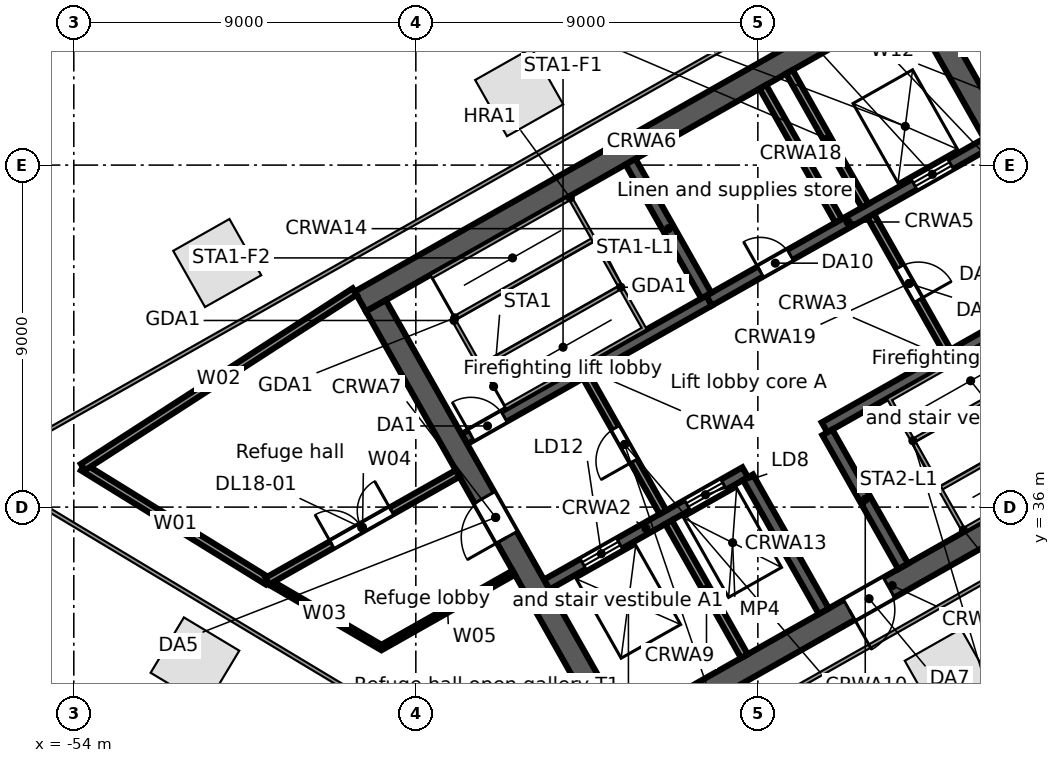
"""IFC4 building model, lengths in metres.
Left out: names, types, materials, properties, quantities, classifications, styles, units other than length and angle.
Written with IfcOpenShell. Run it as: python <this file> out.ifc"""

import sys

from ifc_helpers import new_model, si_unit, direction, frame, frame_2d, origin, origin_2d, place, context, subcontext, project, spatial, rectangle, extrude, element, fill, save


model = new_model("IFC4")
c1 = context("Model", 3, precision=1e-05, world=origin(), true_north=direction((0.0, 1.0)))
c2 = subcontext(c1, "Body", "Model", "MODEL_VIEW")
j1 = project(units=[si_unit("LENGTHUNIT", "METRE"), si_unit("PLANEANGLEUNIT", "RADIAN")], contexts=[c1])
p1 = place(None, origin())
s1 = spatial("IfcSite", under=j1, at=p1, CompositionType="ELEMENT")
p2 = place(p1, origin())
s2 = spatial("IfcBuilding", under=s1, at=p2, CompositionType="ELEMENT")
p3 = place(p2, frame((0.0, 0.0, 91.5)))
s3 = spatial("IfcBuildingStorey", under=s2, at=p3, CompositionType="ELEMENT", Elevation=91.5)
for number, where, z_axis, x_axis in (
    (1, (-42.28, 46.919, 0.0), (0.0, 0.0, 1.0), (-0.87, -0.492, 0.0)),
    (2, (-50.226, 42.423, 0.0), (0.0, 0.0, 1.0), (-0.87, -0.492, 0.0)),
    (3, (-50.812, 31.931, 0.0), (0.0, 0.0, 1.0), (0.857, -0.515, 0.0)),
    (4, (-30.976, 31.635, 0.0), (0.0, 0.0, 1.0), (0.87, 0.492, 0.0)),
):
    element("IfcColumn", number, at=place(p3, frame(where, z_axis=z_axis, x_axis=x_axis)), inside=s3, PredefinedType="COLUMN", context=c2, shape_type="SweptSolid", body=[
        extrude(rectangle(XDim=1.7, YDim=1.7, at=origin_2d()), origin(), (0.0, 0.0, 1.0), 5.6),
    ])
p4 = place(p3, frame((-39.862, 29.749, 0.0), z_axis=(0.0, 0.0, 1.0), x_axis=(0.870350116061, 0.492433422375, 0.0)))
e5 = element("IfcWall", 5, at=p4, inside=s3, PredefinedType="SOLIDWALL", context=c2, shape_type="SweptSolid", body=[
    extrude(rectangle(XDim=17.0, YDim=0.6, at=frame_2d((8.5, 0.0))), origin(), (0.0, 0.0, 1.0), 5.28),
])
p5 = place(p4, frame((7.2, 0.0, 0.0)))
e6 = element("IfcOpeningElement", 6, at=p5, cuts=e5, PredefinedType="OPENING", context=c2, shape_type="SweptSolid", body=[
    extrude(rectangle(XDim=1.2, YDim=2.1, at=frame_2d((0.6, 1.05))), frame((0.0, 0.31, 0.0), z_axis=(0.0, -1.0, 0.0), x_axis=(1.0, 0.0, 0.0)), (0.0, 0.0, 1.0), 0.62),
])
p6 = place(p3, frame((-41.556, 33.961, 0.0), z_axis=(0.0, 0.0, 1.0), x_axis=(0.870343731308, 0.492444706919, 0.0)))
e7 = element("IfcWall", 7, at=p6, inside=s3, PredefinedType="SOLIDWALL", context=c2, shape_type="SweptSolid", body=[
    extrude(rectangle(XDim=6.0, YDim=0.3, at=frame_2d((3.0, 0.0))), origin(), (0.0, 0.0, 1.0), 5.28),
])
p7 = place(p6, frame((1.1, 0.0, 0.0)))
e8 = element("IfcOpeningElement", 8, at=p7, cuts=e7, PredefinedType="OPENING", context=c2, shape_type="SweptSolid", body=[
    extrude(rectangle(XDim=1.1, YDim=2.1, at=frame_2d((0.55, 1.05))), frame((0.0, 0.16, 0.0), z_axis=(0.0, -1.0, 0.0), x_axis=(1.0, 0.0, 0.0)), (0.0, 0.0, 1.0), 0.32),
])
p8 = place(p6, frame((4.25, 0.0, 0.0)))
e9 = element("IfcOpeningElement", 9, at=p8, cuts=e7, PredefinedType="OPENING", context=c2, shape_type="SweptSolid", body=[
    extrude(rectangle(XDim=1.1, YDim=2.1, at=frame_2d((0.55, 1.05))), frame((0.0, 0.16, 0.0), z_axis=(0.0, -1.0, 0.0), x_axis=(1.0, 0.0, 0.0)), (0.0, 0.0, 1.0), 0.32),
])
p9 = place(p3, frame((-34.245, 38.097, 0.0), z_axis=(0.0, 0.0, 1.0), x_axis=(0.870364910201, 0.492407273597, 0.0)))
e10 = element("IfcWall", 10, at=p9, inside=s3, PredefinedType="SOLIDWALL", context=c2, shape_type="SweptSolid", body=[
    extrude(rectangle(XDim=7.4, YDim=0.3, at=frame_2d((3.7, 0.0))), origin(), (0.0, 0.0, 1.0), 5.28),
])
p10 = place(p9, frame((6.2, 0.0, 0.0)))
e11 = element("IfcOpeningElement", 11, at=p10, cuts=e10, PredefinedType="OPENING", context=c2, shape_type="SweptSolid", body=[
    extrude(rectangle(XDim=1.0, YDim=2.1, at=frame_2d((0.5, 1.05))), frame((0.0, 0.16, 0.0), z_axis=(0.0, -1.0, 0.0), x_axis=(1.0, 0.0, 0.0)), (0.0, 0.0, 1.0), 0.32),
])
p11 = place(p3, frame((-43.723, 37.791, 0.0), z_axis=(0.0, 0.0, 1.0), x_axis=(0.87035077051, 0.49243226567, 0.0)))
e12 = element("IfcWall", 12, at=p11, inside=s3, PredefinedType="SOLIDWALL", context=c2, shape_type="SweptSolid", body=[
    extrude(rectangle(XDim=7.4, YDim=0.3, at=frame_2d((3.7, 0.0))), origin(), (0.0, 0.0, 1.0), 5.28),
])
p12 = place(p11, frame((0.2, 0.0, 0.0)))
e13 = element("IfcOpeningElement", 13, at=p12, cuts=e12, PredefinedType="OPENING", context=c2, shape_type="SweptSolid", body=[
    extrude(rectangle(XDim=1.0, YDim=2.1, at=frame_2d((0.5, 1.05))), frame((0.0, 0.16, 0.0), z_axis=(0.0, -1.0, 0.0), x_axis=(1.0, 0.0, 0.0)), (0.0, 0.0, 1.0), 0.32),
])
p13 = place(p3, frame((-37.282, 41.435, 0.0), z_axis=(0.0, 0.0, 1.0), x_axis=(0.870356516133, 0.492422110414, 0.0)))
e14 = element("IfcWall", 14, at=p13, inside=s3, PredefinedType="SOLIDWALL", context=c2, shape_type="SweptSolid", body=[
    extrude(rectangle(XDim=8.4, YDim=0.3, at=frame_2d((4.2, 0.0))), origin(), (0.0, 0.0, 1.0), 5.28),
])
p14 = place(p13, frame((6.2, 0.0, 0.0)))
e15 = element("IfcOpeningElement", 15, at=p14, cuts=e14, PredefinedType="OPENING", context=c2, shape_type="SweptSolid", body=[
    extrude(rectangle(XDim=1.1, YDim=2.1, at=frame_2d((0.55, 1.05))), frame((0.0, 0.16, 0.0), z_axis=(0.0, -1.0, 0.0), x_axis=(1.0, 0.0, 0.0)), (0.0, 0.0, 1.0), 0.32),
])
p15 = place(p13, frame((1.55, 0.0, 0.0)))
e16 = element("IfcOpeningElement", 16, at=p15, cuts=e14, PredefinedType="OPENING", context=c2, shape_type="SweptSolid", body=[
    extrude(rectangle(XDim=0.9, YDim=2.1, at=frame_2d((0.45, 1.05))), frame((0.0, 0.16, 0.0), z_axis=(0.0, -1.0, 0.0), x_axis=(1.0, 0.0, 0.0)), (0.0, 0.0, 1.0), 0.32),
])
p16 = place(p3, frame((-46.461, 41.412, 0.0), z_axis=(0.0, 0.0, 1.0), x_axis=(0.870350116061, 0.492433422375, 0.0)))
e17 = element("IfcWall", 17, at=p16, inside=s3, PredefinedType="SOLIDWALL", context=c2, shape_type="SweptSolid", body=[
    extrude(rectangle(XDim=17.0, YDim=0.6, at=frame_2d((8.5, 0.0))), origin(), (0.0, 0.0, 1.0), 5.28),
])
p17 = place(p3, frame((-46.052, 41.298, 0.0), z_axis=(0.0, 0.0, 1.0), x_axis=(0.492418598281, -0.870358503186, 0.0)))
e18 = element("IfcWall", 18, at=p17, inside=s3, PredefinedType="SOLIDWALL", context=c2, shape_type="SweptSolid", body=[
    extrude(rectangle(XDim=12.8, YDim=0.6, at=frame_2d((6.4, 0.0))), origin(), (0.0, 0.0, 1.0), 5.28),
])
p18 = place(p17, frame((5.8, 0.0, 0.0)))
e19 = element("IfcOpeningElement", 19, at=p18, cuts=e18, PredefinedType="OPENING", context=c2, shape_type="SweptSolid", body=[
    extrude(rectangle(XDim=1.2, YDim=2.1, at=frame_2d((0.6, 1.05))), frame((0.0, 0.31, 0.0), z_axis=(0.0, -1.0, 0.0), x_axis=(1.0, 0.0, 0.0)), (0.0, 0.0, 1.0), 0.62),
])
p19 = place(p3, frame((-38.349, 35.603, 0.0), z_axis=(0.0, 0.0, 1.0), x_axis=(0.49241474071, -0.870360685654, 0.0)))
e20 = element("IfcWall", 20, at=p19, inside=s3, PredefinedType="SOLIDWALL", context=c2, shape_type="SweptSolid", body=[
    extrude(rectangle(XDim=4.05, YDim=0.2, at=frame_2d((2.025, 0.0))), origin(), (0.0, 0.0, 1.0), 5.28),
])
p20 = place(p3, frame((-40.516, 39.433, 0.0), z_axis=(0.0, 0.0, 1.0), x_axis=(0.492453559952, -0.87033872216, 0.0)))
e21 = element("IfcWall", 21, at=p20, inside=s3, PredefinedType="PARTITIONING", context=c2, shape_type="SweptSolid", body=[
    extrude(rectangle(XDim=4.1, YDim=0.2, at=frame_2d((2.05, 0.0))), origin(), (0.0, 0.0, 1.0), 5.28),
])
p21 = place(p20, frame((1.55, 0.0, 0.0)))
e22 = element("IfcOpeningElement", 22, at=p21, cuts=e21, PredefinedType="OPENING", context=c2, shape_type="SweptSolid", body=[
    extrude(rectangle(XDim=1.0, YDim=2.1, at=frame_2d((0.5, 1.05))), frame((0.0, 0.11, 0.0), z_axis=(0.0, -1.0, 0.0), x_axis=(1.0, 0.0, 0.0)), (0.0, 0.0, 1.0), 0.22),
])
p22 = place(p3, frame((-36.26, 36.785, 0.0), z_axis=(0.0, 0.0, 1.0), x_axis=(0.492440575896, -0.870346068648, 0.0)))
e23 = element("IfcWall", 23, at=p22, inside=s3, PredefinedType="SOLIDWALL", context=c2, shape_type="SweptSolid", body=[
    extrude(rectangle(XDim=4.05, YDim=0.3, at=frame_2d((2.025, 0.0))), origin(), (0.0, 0.0, 1.0), 5.28),
])
p23 = place(p3, frame((-39.35, 45.09, 0.0), z_axis=(0.0, 0.0, 1.0), x_axis=(0.49241474071, -0.870360685654, 0.0)))
e24 = element("IfcWall", 24, at=p23, inside=s3, PredefinedType="SOLIDWALL", context=c2, shape_type="SweptSolid", body=[
    extrude(rectangle(XDim=4.05, YDim=0.3, at=frame_2d((2.025, 0.0))), origin(), (0.0, 0.0, 1.0), 5.28),
])
p24 = place(p3, frame((-34.171, 37.967, 0.0), z_axis=(0.0, 0.0, 1.0), x_axis=(0.492394910396, -0.870371904542, 0.0)))
e25 = element("IfcWall", 25, at=p24, inside=s3, PredefinedType="SOLIDWALL", context=c2, shape_type="SweptSolid", body=[
    extrude(rectangle(XDim=4.05, YDim=0.3, at=frame_2d((2.025, 0.0))), origin(), (0.0, 0.0, 1.0), 5.28),
])
p25 = place(p3, frame((-35.869, 47.06, 0.0), z_axis=(0.0, 0.0, 1.0), x_axis=(0.49241474071, -0.870360685654, 0.0)))
e26 = element("IfcWall", 26, at=p25, inside=s3, PredefinedType="SOLIDWALL", context=c2, shape_type="SweptSolid", body=[
    extrude(rectangle(XDim=4.05, YDim=0.2, at=frame_2d((2.025, 0.0))), origin(), (0.0, 0.0, 1.0), 5.28),
])
p26 = place(p3, frame((-33.031, 43.667, 0.0), z_axis=(0.0, 0.0, 1.0), x_axis=(0.492408451753, -0.87036424366, 0.0)))
e27 = element("IfcWall", 27, at=p26, inside=s3, PredefinedType="PARTITIONING", context=c2, shape_type="SweptSolid", body=[
    extrude(rectangle(XDim=4.1, YDim=0.2, at=frame_2d((2.05, 0.0))), origin(), (0.0, 0.0, 1.0), 5.28),
])
p27 = place(p26, frame((1.55, 0.0, 0.0)))
e28 = element("IfcOpeningElement", 28, at=p27, cuts=e27, PredefinedType="OPENING", context=c2, shape_type="SweptSolid", body=[
    extrude(rectangle(XDim=1.0, YDim=2.1, at=frame_2d((0.5, 1.05))), frame((0.0, 0.11, 0.0), z_axis=(0.0, -1.0, 0.0), x_axis=(1.0, 0.0, 0.0)), (0.0, 0.0, 1.0), 0.22),
])
p28 = place(p3, frame((-35.173, 47.454, 0.0), z_axis=(0.0, 0.0, 1.0), x_axis=(0.492440575896, -0.870346068648, 0.0)))
e29 = element("IfcWall", 29, at=p28, inside=s3, PredefinedType="SOLIDWALL", context=c2, shape_type="SweptSolid", body=[
    extrude(rectangle(XDim=4.05, YDim=0.2, at=frame_2d((2.025, 0.0))), origin(), (0.0, 0.0, 1.0), 5.28),
])
p29 = place(p3, frame((-31.778, 49.374, 0.0), z_axis=(0.0, 0.0, 1.0), x_axis=(0.492433046652, -0.870350328641, 0.0)))
e30 = element("IfcWall", 30, at=p29, inside=s3, PredefinedType="SOLIDWALL", context=c2, shape_type="SweptSolid", body=[
    extrude(rectangle(XDim=12.8, YDim=0.6, at=frame_2d((6.4, 0.0))), origin(), (0.0, 0.0, 1.0), 5.28),
])
p30 = place(p29, frame((5.8, 0.0, 0.0)))
e31 = element("IfcOpeningElement", 31, at=p30, cuts=e30, PredefinedType="OPENING", context=c2, shape_type="SweptSolid", body=[
    extrude(rectangle(XDim=1.2, YDim=2.1, at=frame_2d((0.6, 1.05))), frame((0.0, 0.31, 0.0), z_axis=(0.0, -1.0, 0.0), x_axis=(1.0, 0.0, 0.0)), (0.0, 0.0, 1.0), 0.62),
])
p31 = place(p3, frame((-53.76, 37.052, 0.0), z_axis=(0.0, 0.0, 1.0), x_axis=(0.850846379399, -0.525414539828, 0.0)))
e32 = element("IfcWall", 32, at=p31, inside=s3, PredefinedType="PARTITIONING", context=c2, shape_type="SweptSolid", body=[
    extrude(rectangle(XDim=5.706, YDim=0.2, at=frame_2d((2.853, 0.0))), origin(), (0.0, 0.0, 1.0), 5.28),
])
p32 = place(p3, frame((-53.76, 37.052, 0.0), z_axis=(0.0, 0.0, 1.0), x_axis=(0.83989696129, 0.542745883831, 0.0)))
e33 = element("IfcWall", 33, at=p32, inside=s3, PredefinedType="PARTITIONING", context=c2, shape_type="SweptSolid", body=[
    extrude(rectangle(XDim=8.514, YDim=0.2, at=frame_2d((4.257, 0.0))), origin(), (0.0, 0.0, 1.0), 4.36),
])
p33 = place(p3, frame((-48.905, 34.054, 0.0), z_axis=(0.0, 0.0, 1.0), x_axis=(0.863972582591, -0.50353885305, 0.0)))
e34 = element("IfcWall", 34, at=p33, inside=s3, PredefinedType="PARTITIONING", context=c2, shape_type="SweptSolid", body=[
    extrude(rectangle(XDim=3.473, YDim=0.125, at=frame_2d((1.737, 0.0))), origin(), (0.0, 0.0, 1.0), 4.36),
])
p34 = place(p3, frame((-48.905, 34.054, 0.0), z_axis=(0.0, 0.0, 1.0), x_axis=(0.870335821512, 0.492458686383, 0.0)))
e35 = element("IfcWall", 35, at=p34, inside=s3, PredefinedType="PARTITIONING", context=c2, shape_type="SweptSolid", body=[
    extrude(rectangle(XDim=5.751, YDim=0.2, at=frame_2d((2.875, 0.0))), origin(), (0.0, 0.0, 1.0), 4.36),
])
p35 = place(p34, frame((1.95, 0.0, 0.0)))
e36 = element("IfcOpeningElement", 36, at=p35, cuts=e35, PredefinedType="OPENING", context=c2, shape_type="SweptSolid", body=[
    extrude(rectangle(XDim=1.8, YDim=2.1, at=frame_2d((0.9, 1.05))), frame((0.0, 0.11, 0.0), z_axis=(0.0, -1.0, 0.0), x_axis=(1.0, 0.0, 0.0)), (0.0, 0.0, 1.0), 0.22),
])
p36 = place(p3, frame((-45.904, 32.305, 0.0), z_axis=(0.0, 0.0, 1.0), x_axis=(0.870297830159, 0.492525823506, 0.0)))
e37 = element("IfcWall", 37, at=p36, inside=s3, PredefinedType="PARTITIONING", context=c2, shape_type="SweptSolid", body=[
    extrude(rectangle(XDim=4.0, YDim=0.125, at=frame_2d((2.0, 0.0))), origin(), (0.0, 0.0, 1.0), 5.28),
])
p37 = place(p14, origin())
e38 = element("IfcDoor", 38, at=p37, inside=s3, OperationType="DOUBLE_DOOR_SLIDING", PredefinedType="DOOR", context=c2, shape_type="SweptSolid", body=[
    extrude(rectangle(XDim=1.1, YDim=2.1, at=frame_2d((0.55, 1.05))), frame((0.0, 0.025, 0.0), z_axis=(0.0, -1.0, 0.0), x_axis=(1.0, 0.0, 0.0)), (0.0, 0.0, 1.0), 0.05),
])
fill(e15, e38)
p38 = place(p7, origin())
e39 = element("IfcDoor", 39, at=p38, inside=s3, OperationType="DOUBLE_DOOR_SLIDING", PredefinedType="DOOR", context=c2, shape_type="SweptSolid", body=[
    extrude(rectangle(XDim=1.1, YDim=2.1, at=frame_2d((0.55, 1.05))), frame((0.0, 0.025, 0.0), z_axis=(0.0, -1.0, 0.0), x_axis=(1.0, 0.0, 0.0)), (0.0, 0.0, 1.0), 0.05),
])
fill(e8, e39)
p39 = place(p8, origin())
e40 = element("IfcDoor", 40, at=p39, inside=s3, OperationType="DOUBLE_DOOR_SLIDING", PredefinedType="DOOR", context=c2, shape_type="SweptSolid", body=[
    extrude(rectangle(XDim=1.1, YDim=2.1, at=frame_2d((0.55, 1.05))), frame((0.0, 0.025, 0.0), z_axis=(0.0, -1.0, 0.0), x_axis=(1.0, 0.0, 0.0)), (0.0, 0.0, 1.0), 0.05),
])
fill(e9, e40)
p40 = place(p12, origin())
e41 = element("IfcDoor", 41, at=p40, inside=s3, OperationType="SINGLE_SWING_LEFT", PredefinedType="DOOR", context=c2, shape_type="SweptSolid", body=[
    extrude(rectangle(XDim=1.0, YDim=2.1, at=frame_2d((0.5, 1.05))), frame((0.0, 0.025, 0.0), z_axis=(0.0, -1.0, 0.0), x_axis=(1.0, 0.0, 0.0)), (0.0, 0.0, 1.0), 0.05),
])
fill(e13, e41)
p41 = place(p21, frame((1.0, 0.0, 0.0), z_axis=(0.0, 0.0, 1.0), x_axis=(-1.0, 0.0, 0.0)))
e42 = element("IfcDoor", 42, at=p41, inside=s3, OperationType="SINGLE_SWING_LEFT", PredefinedType="DOOR", context=c2, shape_type="SweptSolid", body=[
    extrude(rectangle(XDim=1.0, YDim=2.1, at=frame_2d((0.5, 1.05))), frame((0.0, 0.025, 0.0), z_axis=(0.0, -1.0, 0.0), x_axis=(1.0, 0.0, 0.0)), (0.0, 0.0, 1.0), 0.05),
])
fill(e22, e42)
p42 = place(p18, frame((1.2, 0.0, 0.0), z_axis=(0.0, 0.0, 1.0), x_axis=(-1.0, 0.0, 0.0)))
e43 = element("IfcDoor", 43, at=p42, inside=s3, OperationType="SINGLE_SWING_LEFT", PredefinedType="DOOR", context=c2, shape_type="SweptSolid", body=[
    extrude(rectangle(XDim=1.2, YDim=2.1, at=frame_2d((0.6, 1.05))), frame((0.0, 0.025, 0.0), z_axis=(0.0, -1.0, 0.0), x_axis=(1.0, 0.0, 0.0)), (0.0, 0.0, 1.0), 0.05),
])
fill(e19, e43)
p43 = place(p27, origin())
e44 = element("IfcDoor", 44, at=p43, inside=s3, OperationType="SINGLE_SWING_RIGHT", PredefinedType="DOOR", context=c2, shape_type="SweptSolid", body=[
    extrude(rectangle(XDim=1.0, YDim=2.1, at=frame_2d((0.5, 1.05))), frame((0.0, 0.025, 0.0), z_axis=(0.0, -1.0, 0.0), x_axis=(1.0, 0.0, 0.0)), (0.0, 0.0, 1.0), 0.05),
])
fill(e28, e44)
p44 = place(p5, frame((1.2, 0.0, 0.0), z_axis=(0.0, 0.0, 1.0), x_axis=(-1.0, 0.0, 0.0)))
e45 = element("IfcDoor", 45, at=p44, inside=s3, OperationType="SINGLE_SWING_RIGHT", PredefinedType="DOOR", context=c2, shape_type="SweptSolid", body=[
    extrude(rectangle(XDim=1.2, YDim=2.1, at=frame_2d((0.6, 1.05))), frame((0.0, 0.025, 0.0), z_axis=(0.0, -1.0, 0.0), x_axis=(1.0, 0.0, 0.0)), (0.0, 0.0, 1.0), 0.05),
])
fill(e6, e45)
p45 = place(p15, origin())
e46 = element("IfcDoor", 46, at=p45, inside=s3, OperationType="SINGLE_SWING_LEFT", PredefinedType="DOOR", context=c2, shape_type="SweptSolid", body=[
    extrude(rectangle(XDim=0.9, YDim=2.1, at=frame_2d((0.45, 1.05))), frame((0.0, 0.025, 0.0), z_axis=(0.0, -1.0, 0.0), x_axis=(1.0, 0.0, 0.0)), (0.0, 0.0, 1.0), 0.05),
])
fill(e16, e46)
p46 = place(p35, origin())
e47 = element("IfcDoor", 47, at=p46, inside=s3, OperationType="DOUBLE_DOOR_SINGLE_SWING", PredefinedType="DOOR", context=c2, shape_type="SweptSolid", body=[
    extrude(rectangle(XDim=1.8, YDim=2.1, at=frame_2d((0.9, 1.05))), frame((0.0, 0.025, 0.0), z_axis=(0.0, -1.0, 0.0), x_axis=(1.0, 0.0, 0.0)), (0.0, 0.0, 1.0), 0.05),
])
fill(e36, e47)
save(model, sys.argv[1])
